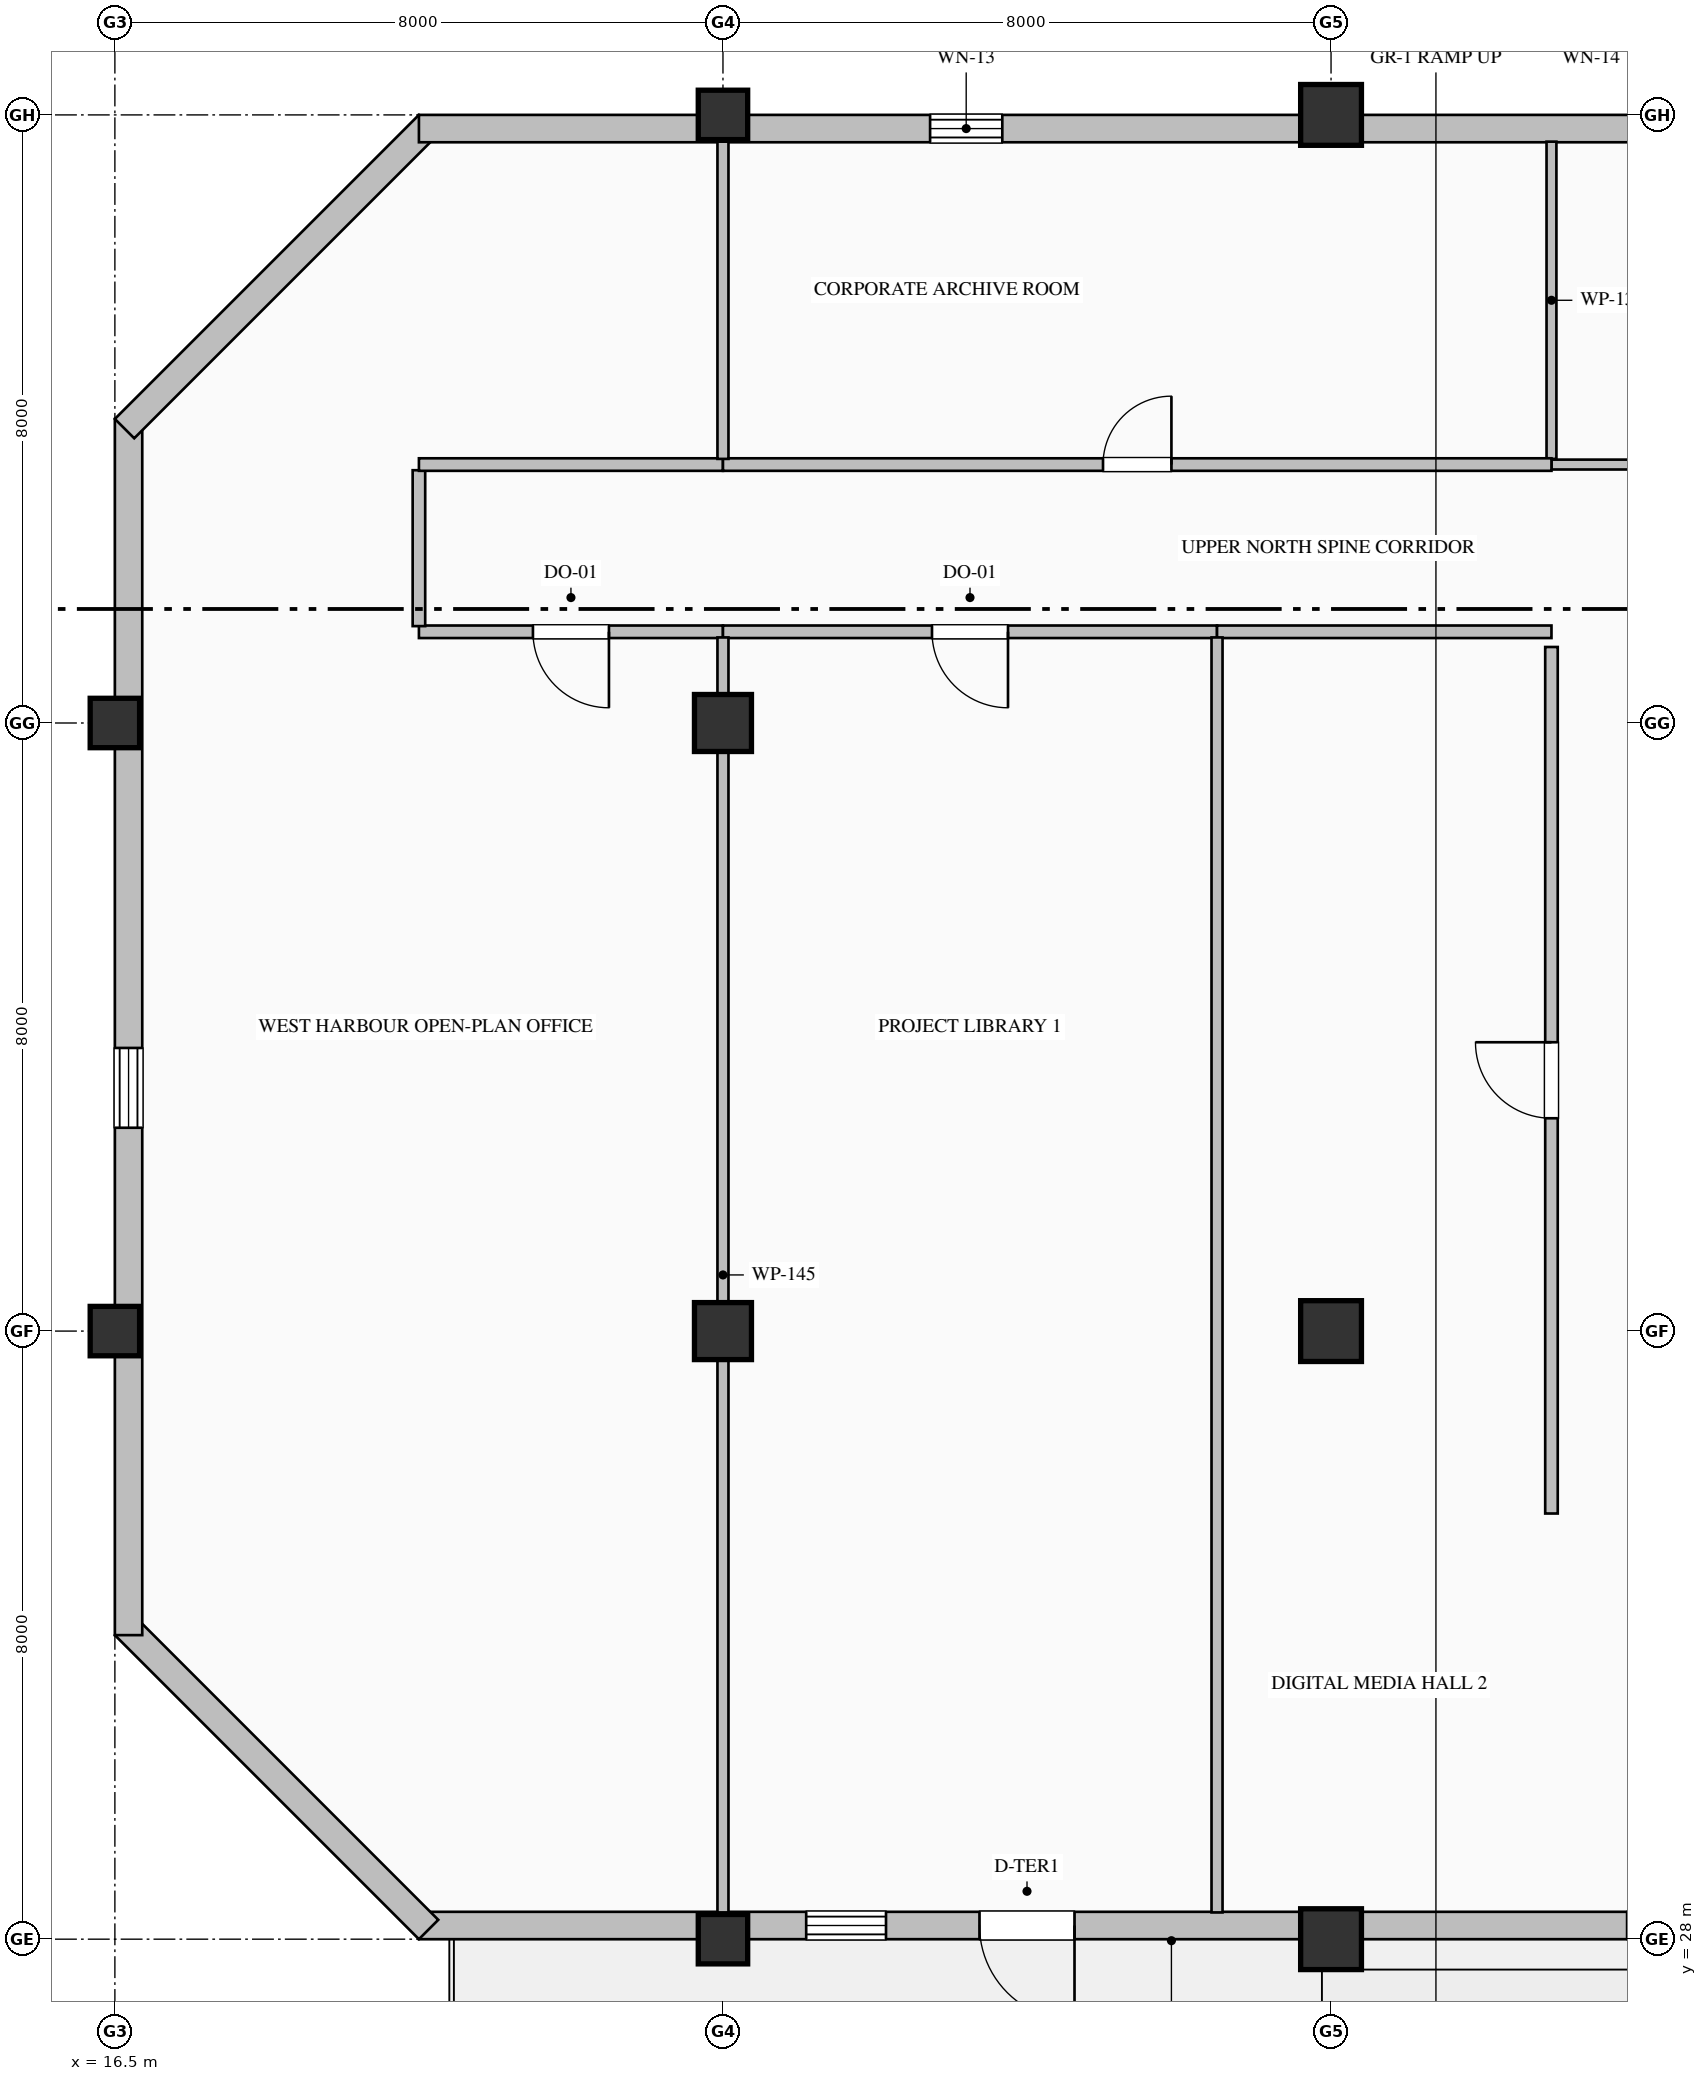
"""IFC4 building model, lengths in metres.
Left out: names, types, materials, properties, quantities, classifications, styles, units other than length and angle.
Written with IfcOpenShell. Run it as: python <this file> out.ifc"""

import sys

from ifc_helpers import new_model, si_unit, direction, frame, frame_2d, origin, origin_2d, place, context, subcontext, project, spatial, rectangle, hollow_rectangle, extrude, element, fill, save


model = new_model("IFC4")
c1 = context("Model", 3, precision=1e-05, world=origin(), true_north=direction((0.0, 1.0)))
c2 = subcontext(c1, "Body", "Model", "MODEL_VIEW")
j1 = project(units=[si_unit("LENGTHUNIT", "METRE"), si_unit("PLANEANGLEUNIT", "RADIAN")], contexts=[c1])
p1 = place(None, origin())
s1 = spatial("IfcSite", under=j1, at=p1, CompositionType="ELEMENT")
p2 = place(p1, origin())
s2 = spatial("IfcBuilding", under=s1, at=p2, CompositionType="ELEMENT")
p3 = place(p2, frame((0.0, 0.0, 323.2)))
s3 = spatial("IfcBuildingStorey", under=s2, at=p3, CompositionType="ELEMENT", Elevation=323.2)
for number, where, z_axis, x_axis in (
    (1, (16.5, 36.0, 0.0), (0.0, 0.0, 1.0), (1.0, 0.0, 0.0)),
    (2, (16.5, 44.0, 0.0), (0.0, 0.0, 1.0), (1.0, 0.0, 0.0)),
    (3, (24.5, 28.0, 0.0), (0.0, 0.0, 1.0), (1.0, 0.0, 0.0)),
):
    element("IfcColumn", number, at=place(p3, frame(where, z_axis=z_axis, x_axis=x_axis)), inside=s3, PredefinedType="COLUMN", context=c2, shape_type="SweptSolid", body=[
        extrude(hollow_rectangle(XDim=0.65, YDim=0.65, WallThickness=0.028, at=origin_2d()), origin(), (0.0, 0.0, 1.0), 4.0),
    ])
for number, where, z_axis, x_axis in (
    (4, (24.5, 36.0, 0.0), (0.0, 0.0, 1.0), (1.0, 0.0, 0.0)),
    (5, (24.5, 44.0, 0.0), (0.0, 0.0, 1.0), (1.0, 0.0, 0.0)),
):
    element("IfcColumn", number, at=place(p3, frame(where, z_axis=z_axis, x_axis=x_axis)), inside=s3, PredefinedType="COLUMN", context=c2, shape_type="SweptSolid", body=[
        extrude(rectangle(XDim=0.75, YDim=0.75, at=origin_2d()), origin(), (0.0, 0.0, 1.0), 4.0),
    ])
p4 = place(p3, frame((24.5, 52.0, 0.0), z_axis=(0.0, 0.0, 1.0), x_axis=(1.0, 0.0, 0.0)))
e6 = element("IfcColumn", 6, at=p4, inside=s3, PredefinedType="COLUMN", context=c2, shape_type="SweptSolid", body=[
    extrude(hollow_rectangle(XDim=0.65, YDim=0.65, WallThickness=0.028, at=origin_2d()), origin(), (0.0, 0.0, 1.0), 4.0),
])
for number, where, z_axis, x_axis in (
    (7, (32.5, 28.0, 0.0), (0.0, 0.0, 1.0), (1.0, 0.0, 0.0)),
    (8, (32.5, 36.0, 0.0), (0.0, 0.0, 1.0), (1.0, 0.0, 0.0)),
    (9, (32.5, 52.0, 0.0), (0.0, 0.0, 1.0), (1.0, 0.0, 0.0)),
):
    element("IfcColumn", number, at=place(p3, frame(where, z_axis=z_axis, x_axis=x_axis)), inside=s3, PredefinedType="COLUMN", context=c2, shape_type="SweptSolid", body=[
        extrude(hollow_rectangle(XDim=0.8, YDim=0.8, WallThickness=0.032, at=origin_2d()), origin(), (0.0, 0.0, 1.0), 4.0),
    ])
p5 = place(p3, frame((40.52, 28.18, 0.0), z_axis=(0.0, 0.0, 1.0), x_axis=(-1.0, 0.0, 0.0)))
e10 = element("IfcWall", 10, at=p5, inside=s3, PredefinedType="SOLIDWALL", context=c2, shape_type="SweptSolid", body=[
    extrude(rectangle(XDim=20.02, YDim=0.36, at=frame_2d((10.01, 0.0))), origin(), (0.0, 0.0, 1.0), 3.185),
])
p6 = place(p5, frame((3.075, 0.0, 0.8)))
e11 = element("IfcOpeningElement", 11, at=p6, cuts=e10, PredefinedType="OPENING", context=c2, shape_type="SweptSolid", body=[
    extrude(rectangle(XDim=1.05, YDim=2.15, at=frame_2d((0.525, 1.075))), frame((0.0, 0.19, 0.0), z_axis=(0.0, -1.0, 0.0), x_axis=(1.0, 0.0, 0.0)), (0.0, 0.0, 1.0), 0.38),
])
p7 = place(p5, frame((13.875, 0.0, 0.8)))
e12 = element("IfcOpeningElement", 12, at=p7, cuts=e10, PredefinedType="OPENING", context=c2, shape_type="SweptSolid", body=[
    extrude(rectangle(XDim=1.05, YDim=2.15, at=frame_2d((0.525, 1.075))), frame((0.0, 0.19, 0.0), z_axis=(0.0, -1.0, 0.0), x_axis=(1.0, 0.0, 0.0)), (0.0, 0.0, 1.0), 0.38),
])
p8 = place(p5, frame((11.395, 0.0, 0.0)))
e13 = element("IfcOpeningElement", 13, at=p8, cuts=e10, PredefinedType="OPENING", context=c2, shape_type="SweptSolid", body=[
    extrude(rectangle(XDim=1.25, YDim=2.25, at=frame_2d((0.625, 1.125))), frame((0.0, 0.19, 0.0), z_axis=(0.0, -1.0, 0.0), x_axis=(1.0, 0.0, 0.0)), (0.0, 0.0, 1.0), 0.38),
])
p9 = place(p3, frame((20.627, 28.127, 0.0), z_axis=(0.0, 0.0, 1.0), x_axis=(-0.707106781187, 0.707106781187, 0.0)))
e14 = element("IfcWall", 14, at=p9, inside=s3, PredefinedType="SOLIDWALL", context=c2, shape_type="SweptSolid", body=[
    extrude(rectangle(XDim=5.657, YDim=0.36, at=frame_2d((2.828, 0.0))), origin(), (0.0, 0.0, 1.0), 3.785),
])
p10 = place(p3, frame((16.68, 32.0, 0.0), z_axis=(0.0, 0.0, 1.0), x_axis=(0.0, 1.0, 0.0)))
e15 = element("IfcWall", 15, at=p10, inside=s3, PredefinedType="SOLIDWALL", context=c2, shape_type="SweptSolid", body=[
    extrude(rectangle(XDim=16.0, YDim=0.36, at=frame_2d((8.0, 0.0))), origin(), (0.0, 0.0, 1.0), 3.335),
])
p11 = place(p10, frame((6.675, 0.0, 0.8)))
e16 = element("IfcOpeningElement", 16, at=p11, cuts=e15, PredefinedType="OPENING", context=c2, shape_type="SweptSolid", body=[
    extrude(rectangle(XDim=1.05, YDim=2.15, at=frame_2d((0.525, 1.075))), frame((0.0, 0.19, 0.0), z_axis=(0.0, -1.0, 0.0), x_axis=(1.0, 0.0, 0.0)), (0.0, 0.0, 1.0), 0.38),
])
p12 = place(p3, frame((16.627, 47.873, 0.0), z_axis=(0.0, 0.0, 1.0), x_axis=(0.707106781187, 0.707106781187, 0.0)))
e17 = element("IfcWall", 17, at=p12, inside=s3, PredefinedType="SOLIDWALL", context=c2, shape_type="SweptSolid", body=[
    extrude(rectangle(XDim=5.657, YDim=0.36, at=frame_2d((2.828, 0.0))), origin(), (0.0, 0.0, 1.0), 3.785),
])
p13 = place(p3, frame((20.5, 51.82, 0.0), z_axis=(0.0, 0.0, 1.0), x_axis=(1.0, 0.0, 0.0)))
e18 = element("IfcWall", 18, at=p13, inside=s3, PredefinedType="SOLIDWALL", context=c2, shape_type="SweptSolid", body=[
    extrude(rectangle(XDim=20.02, YDim=0.36, at=frame_2d((10.01, 0.0))), origin(), (0.0, 0.0, 1.0), 3.335),
])
p14 = place(p13, frame((6.725, 0.0, 0.9)))
e19 = element("IfcOpeningElement", 19, at=p14, cuts=e18, PredefinedType="OPENING", context=c2, shape_type="SweptSolid", body=[
    extrude(rectangle(XDim=0.95, YDim=1.85, at=frame_2d((0.475, 0.925))), frame((0.0, 0.19, 0.0), z_axis=(0.0, -1.0, 0.0), x_axis=(1.0, 0.0, 0.0)), (0.0, 0.0, 1.0), 0.38),
])
p15 = place(p3, frame((37.8, 47.4, 0.0), z_axis=(0.0, 0.0, 1.0), x_axis=(-1.0, 0.0, 0.0)))
e20 = element("IfcWall", 20, at=p15, inside=s3, PredefinedType="PARTITIONING", context=c2, shape_type="SweptSolid", body=[
    extrude(rectangle(XDim=2.4, YDim=0.13, at=frame_2d((1.2, 0.0))), origin(), (0.0, 0.0, 1.0), 3.785),
])
p16 = place(p3, frame((35.4, 47.475, 0.0), z_axis=(0.0, 0.0, 1.0), x_axis=(0.0, 1.0, 0.0)))
e21 = element("IfcWall", 21, at=p16, inside=s3, PredefinedType="PARTITIONING", context=c2, shape_type="SweptSolid", body=[
    extrude(rectangle(XDim=4.173, YDim=0.13, at=frame_2d((2.087, 0.0))), origin(), (0.0, 0.0, 1.0), 3.785),
])
p17 = place(p3, frame((24.5, 45.2, 0.0), z_axis=(0.0, 0.0, 1.0), x_axis=(-1.0, 0.0, 0.0)))
e22 = element("IfcWall", 22, at=p17, inside=s3, PredefinedType="PARTITIONING", context=c2, shape_type="SweptSolid", body=[
    extrude(rectangle(XDim=4.0, YDim=0.165, at=frame_2d((2.0, 0.0))), origin(), (0.0, 0.0, 1.0), 3.785),
])
p18 = place(p17, frame((1.5, 0.0, 0.0)))
e23 = element("IfcOpeningElement", 23, at=p18, cuts=e22, PredefinedType="OPENING", context=c2, shape_type="SweptSolid", body=[
    extrude(rectangle(XDim=1.0, YDim=2.15, at=frame_2d((0.5, 1.075))), frame((0.0, 0.093, 0.0), z_axis=(0.0, -1.0, 0.0), x_axis=(1.0, 0.0, 0.0)), (0.0, 0.0, 1.0), 0.185),
])
p19 = place(p3, frame((20.5, 45.274, 0.0), z_axis=(0.0, 0.0, 1.0), x_axis=(0.0, 1.0, 0.0)))
e24 = element("IfcWall", 24, at=p19, inside=s3, PredefinedType="PARTITIONING", context=c2, shape_type="SweptSolid", body=[
    extrude(rectangle(XDim=2.051, YDim=0.165, at=frame_2d((1.025, 0.0))), origin(), (0.0, 0.0, 1.0), 3.785),
])
p20 = place(p3, frame((20.5, 47.4, 0.0), z_axis=(0.0, 0.0, 1.0), x_axis=(1.0, 0.0, 0.0)))
e25 = element("IfcWall", 25, at=p20, inside=s3, PredefinedType="PARTITIONING", context=c2, shape_type="SweptSolid", body=[
    extrude(rectangle(XDim=4.0, YDim=0.165, at=frame_2d((2.0, 0.0))), origin(), (0.0, 0.0, 1.0), 3.785),
])
p21 = place(p3, frame((24.5, 47.4, 0.0), z_axis=(0.0, 0.0, 1.0), x_axis=(1.0, 0.0, 0.0)))
e26 = element("IfcWall", 26, at=p21, inside=s3, PredefinedType="PARTITIONING", context=c2, shape_type="SweptSolid", body=[
    extrude(rectangle(XDim=10.9, YDim=0.165, at=frame_2d((5.45, 0.0))), origin(), (0.0, 0.0, 1.0), 3.785),
])
p22 = place(p21, frame((5.0, 0.0, 0.0)))
e27 = element("IfcOpeningElement", 27, at=p22, cuts=e26, PredefinedType="OPENING", context=c2, shape_type="SweptSolid", body=[
    extrude(rectangle(XDim=0.9, YDim=2.15, at=frame_2d((0.45, 1.075))), frame((0.0, 0.093, 0.0), z_axis=(0.0, -1.0, 0.0), x_axis=(1.0, 0.0, 0.0)), (0.0, 0.0, 1.0), 0.185),
])
p23 = place(p3, frame((31.0, 45.2, 0.0), z_axis=(0.0, 0.0, 1.0), x_axis=(-1.0, 0.0, 0.0)))
e28 = element("IfcWall", 28, at=p23, inside=s3, PredefinedType="PARTITIONING", context=c2, shape_type="SweptSolid", body=[
    extrude(rectangle(XDim=6.5, YDim=0.165, at=frame_2d((3.25, 0.0))), origin(), (0.0, 0.0, 1.0), 3.785),
])
p24 = place(p23, frame((2.75, 0.0, 0.0)))
e29 = element("IfcOpeningElement", 29, at=p24, cuts=e28, PredefinedType="OPENING", context=c2, shape_type="SweptSolid", body=[
    extrude(rectangle(XDim=1.0, YDim=2.15, at=frame_2d((0.5, 1.075))), frame((0.0, 0.093, 0.0), z_axis=(0.0, -1.0, 0.0), x_axis=(1.0, 0.0, 0.0)), (0.0, 0.0, 1.0), 0.185),
])
p25 = place(p3, frame((35.4, 45.2, 0.0), z_axis=(0.0, 0.0, 1.0), x_axis=(-1.0, 0.0, 0.0)))
e30 = element("IfcWall", 30, at=p25, inside=s3, PredefinedType="PARTITIONING", context=c2, shape_type="SweptSolid", body=[
    extrude(rectangle(XDim=4.4, YDim=0.165, at=frame_2d((2.2, 0.0))), origin(), (0.0, 0.0, 1.0), 3.785),
])
p26 = place(p3, frame((35.4, 33.6, 0.0), z_axis=(0.0, 0.0, 1.0), x_axis=(0.0, 1.0, 0.0)))
e31 = element("IfcWall", 31, at=p26, inside=s3, PredefinedType="PARTITIONING", context=c2, shape_type="SweptSolid", body=[
    extrude(rectangle(XDim=11.4, YDim=0.165, at=frame_2d((5.7, 0.0))), origin(), (0.0, 0.0, 1.0), 3.785),
])
p27 = place(p26, frame((5.2, 0.0, 0.0)))
e32 = element("IfcOpeningElement", 32, at=p27, cuts=e31, PredefinedType="OPENING", context=c2, shape_type="SweptSolid", body=[
    extrude(rectangle(XDim=1.0, YDim=2.15, at=frame_2d((0.5, 1.075))), frame((0.0, 0.093, 0.0), z_axis=(0.0, -1.0, 0.0), x_axis=(1.0, 0.0, 0.0)), (0.0, 0.0, 1.0), 0.185),
])
p28 = place(p3, frame((24.5, 51.648, 0.0), z_axis=(0.0, 0.0, 1.0), x_axis=(0.0, -1.0, 0.0)))
e33 = element("IfcWall", 33, at=p28, inside=s3, PredefinedType="PARTITIONING", context=c2, shape_type="SweptSolid", body=[
    extrude(rectangle(XDim=4.173, YDim=0.145, at=frame_2d((2.087, 0.0))), origin(), (0.0, 0.0, 1.0), 3.177),
])
p29 = place(p3, frame((24.5, 45.125, 0.0), z_axis=(0.0, 0.0, 1.0), x_axis=(0.0, -1.0, 0.0)))
e34 = element("IfcWall", 34, at=p29, inside=s3, PredefinedType="PARTITIONING", context=c2, shape_type="SweptSolid", body=[
    extrude(rectangle(XDim=16.773, YDim=0.145, at=frame_2d((8.387, 0.0))), origin(), (0.0, 0.0, 1.0), 3.177),
])
p30 = place(p3, frame((31.0, 45.125, 0.0), z_axis=(0.0, 0.0, 1.0), x_axis=(0.0, -1.0, 0.0)))
e35 = element("IfcWall", 35, at=p30, inside=s3, PredefinedType="PARTITIONING", context=c2, shape_type="SweptSolid", body=[
    extrude(rectangle(XDim=16.773, YDim=0.145, at=frame_2d((8.387, 0.0))), origin(), (0.0, 0.0, 1.0), 3.785),
])
p31 = place(p6, origin())
e36 = element("IfcWindow", 36, at=p31, inside=s3, PartitioningType="SINGLE_PANEL", PredefinedType="WINDOW", context=c2, shape_type="SweptSolid", body=[
    extrude(rectangle(XDim=1.05, YDim=2.15, at=frame_2d((0.525, 1.075))), frame((0.0, 0.15, 0.0), z_axis=(0.0, -1.0, 0.0), x_axis=(1.0, 0.0, 0.0)), (0.0, 0.0, 1.0), 0.06),
])
fill(e11, e36)
p32 = place(p7, origin())
e37 = element("IfcWindow", 37, at=p32, inside=s3, PartitioningType="SINGLE_PANEL", PredefinedType="WINDOW", context=c2, shape_type="SweptSolid", body=[
    extrude(rectangle(XDim=1.05, YDim=2.15, at=frame_2d((0.525, 1.075))), frame((0.0, 0.15, 0.0), z_axis=(0.0, -1.0, 0.0), x_axis=(1.0, 0.0, 0.0)), (0.0, 0.0, 1.0), 0.06),
])
fill(e12, e37)
p33 = place(p11, origin())
e38 = element("IfcWindow", 38, at=p33, inside=s3, PartitioningType="SINGLE_PANEL", PredefinedType="WINDOW", context=c2, shape_type="SweptSolid", body=[
    extrude(rectangle(XDim=1.05, YDim=2.15, at=frame_2d((0.525, 1.075))), frame((0.0, 0.15, 0.0), z_axis=(0.0, -1.0, 0.0), x_axis=(1.0, 0.0, 0.0)), (0.0, 0.0, 1.0), 0.06),
])
fill(e16, e38)
p34 = place(p14, origin())
e39 = element("IfcWindow", 39, at=p34, inside=s3, PartitioningType="SINGLE_PANEL", PredefinedType="WINDOW", context=c2, shape_type="SweptSolid", body=[
    extrude(rectangle(XDim=0.95, YDim=1.85, at=frame_2d((0.475, 0.925))), frame((0.0, 0.15, 0.0), z_axis=(0.0, -1.0, 0.0), x_axis=(1.0, 0.0, 0.0)), (0.0, 0.0, 1.0), 0.06),
])
fill(e19, e39)
p35 = place(p8, origin())
e40 = element("IfcDoor", 40, at=p35, inside=s3, OperationType="SINGLE_SWING_LEFT", PredefinedType="DOOR", context=c2, shape_type="SweptSolid", body=[
    extrude(rectangle(XDim=1.25, YDim=2.25, at=frame_2d((0.625, 1.125))), frame((0.0, 0.025, 0.0), z_axis=(0.0, -1.0, 0.0), x_axis=(1.0, 0.0, 0.0)), (0.0, 0.0, 1.0), 0.05),
])
fill(e13, e40)
p36 = place(p18, origin())
e41 = element("IfcDoor", 41, at=p36, inside=s3, OperationType="SINGLE_SWING_LEFT", PredefinedType="DOOR", context=c2, shape_type="SweptSolid", body=[
    extrude(rectangle(XDim=1.0, YDim=2.15, at=frame_2d((0.5, 1.075))), frame((0.0, 0.025, 0.0), z_axis=(0.0, -1.0, 0.0), x_axis=(1.0, 0.0, 0.0)), (0.0, 0.0, 1.0), 0.05),
])
fill(e23, e41)
p37 = place(p22, origin())
e42 = element("IfcDoor", 42, at=p37, inside=s3, OperationType="SINGLE_SWING_RIGHT", PredefinedType="DOOR", context=c2, shape_type="SweptSolid", body=[
    extrude(rectangle(XDim=0.9, YDim=2.15, at=frame_2d((0.45, 1.075))), frame((0.0, 0.025, 0.0), z_axis=(0.0, -1.0, 0.0), x_axis=(1.0, 0.0, 0.0)), (0.0, 0.0, 1.0), 0.05),
])
fill(e27, e42)
p38 = place(p24, origin())
e43 = element("IfcDoor", 43, at=p38, inside=s3, OperationType="SINGLE_SWING_LEFT", PredefinedType="DOOR", context=c2, shape_type="SweptSolid", body=[
    extrude(rectangle(XDim=1.0, YDim=2.15, at=frame_2d((0.5, 1.075))), frame((0.0, 0.025, 0.0), z_axis=(0.0, -1.0, 0.0), x_axis=(1.0, 0.0, 0.0)), (0.0, 0.0, 1.0), 0.05),
])
fill(e29, e43)
p39 = place(p27, origin())
e44 = element("IfcDoor", 44, at=p39, inside=s3, OperationType="SINGLE_SWING_RIGHT", PredefinedType="DOOR", context=c2, shape_type="SweptSolid", body=[
    extrude(rectangle(XDim=1.0, YDim=2.15, at=frame_2d((0.5, 1.075))), frame((0.0, 0.025, 0.0), z_axis=(0.0, -1.0, 0.0), x_axis=(1.0, 0.0, 0.0)), (0.0, 0.0, 1.0), 0.05),
])
fill(e32, e44)
save(model, sys.argv[1])
